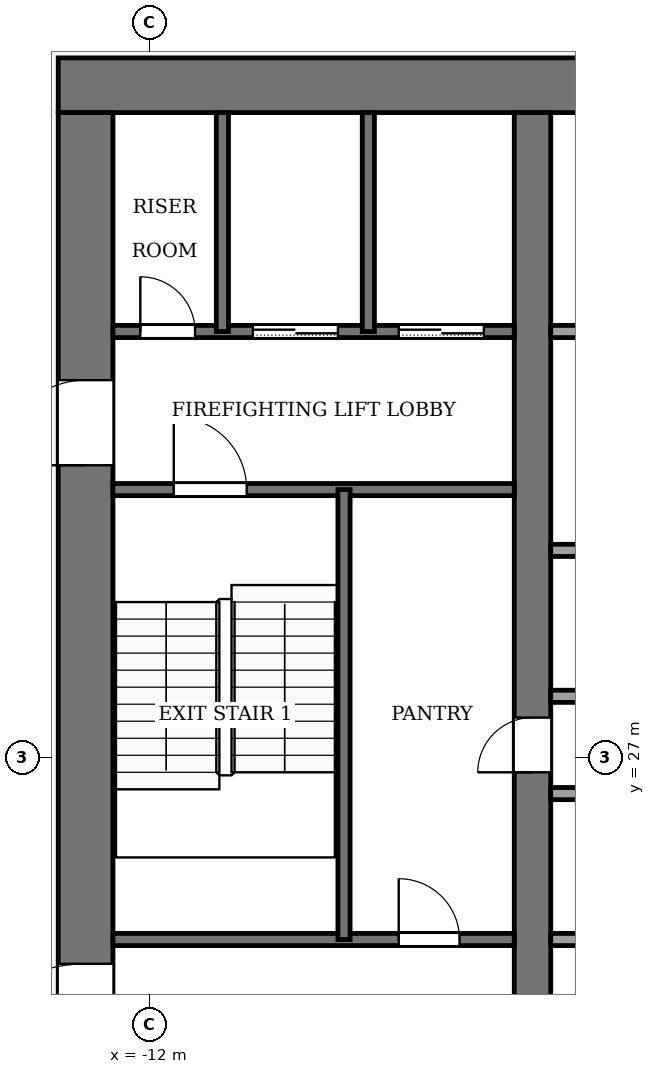
"""IFC4 building model, lengths in metres.
Left out: names, types, materials, properties, quantities, classifications, styles, units other than length and angle.
Written with IfcOpenShell. Run it as: python <this file> out.ifc"""

import sys

from ifc_helpers import new_model, si_unit, direction, frame, frame_2d, origin, place, context, subcontext, project, spatial, rectangle, extrude, element, fill, save


model = new_model("IFC4")
c1 = context("Model", 3, precision=1e-05, world=origin(), true_north=direction((0.0, 1.0)))
c2 = subcontext(c1, "Body", "Model", "MODEL_VIEW")
j1 = project(units=[si_unit("LENGTHUNIT", "METRE"), si_unit("PLANEANGLEUNIT", "RADIAN")], contexts=[c1])
p1 = place(None, origin())
s1 = spatial("IfcSite", under=j1, at=p1, CompositionType="ELEMENT")
p2 = place(p1, origin())
s2 = spatial("IfcBuilding", under=s1, at=p2, CompositionType="ELEMENT")
p3 = place(p2, frame((0.0, 0.0, 214.0)))
s3 = spatial("IfcBuildingStorey", under=s2, at=p3, CompositionType="ELEMENT", Elevation=214.0)
p4 = place(p3, frame((-13.5, 38.05, -0.13), z_axis=(0.0, 0.0, 1.0), x_axis=(1.0, 0.0, 0.0)))
e1 = element("IfcWall", 1, at=p4, inside=s3, PredefinedType="SHEAR", context=c2, shape_type="SweptSolid", body=[
    extrude(rectangle(XDim=27.0, YDim=0.9, at=frame_2d((13.5, 0.0))), origin(), (0.0, 0.0, 1.0), 4.0),
])
p5 = place(p3, frame((-13.05, 18.4, -0.13), z_axis=(0.0, 0.0, 1.0), x_axis=(0.0, 1.0, 0.0)))
e2 = element("IfcWall", 2, at=p5, inside=s3, PredefinedType="SHEAR", context=c2, shape_type="SweptSolid", body=[
    extrude(rectangle(XDim=19.2, YDim=0.9, at=frame_2d((9.6, 0.0))), origin(), (0.0, 0.0, 1.0), 4.0),
])
p6 = place(p5, frame((2.8, 0.0, 0.13)))
e3 = element("IfcOpeningElement", 3, at=p6, cuts=e2, PredefinedType="OPENING", context=c2, shape_type="SweptSolid", body=[
    extrude(rectangle(XDim=2.4, YDim=2.4, at=frame_2d((1.2, 1.2))), frame((0.0, 0.46, 0.0), z_axis=(0.0, -1.0, 0.0), x_axis=(1.0, 0.0, 0.0)), (0.0, 0.0, 1.0), 0.92),
])
p7 = place(p5, frame((13.4, 0.0, 0.13)))
e4 = element("IfcOpeningElement", 4, at=p7, cuts=e2, PredefinedType="OPENING", context=c2, shape_type="SweptSolid", body=[
    extrude(rectangle(XDim=1.4, YDim=2.2, at=frame_2d((0.7, 1.1))), frame((0.0, 0.46, 0.0), z_axis=(0.0, -1.0, 0.0), x_axis=(1.0, 0.0, 0.0)), (0.0, 0.0, 1.0), 0.92),
])
p8 = place(p3, frame((-5.7, 18.4, -0.13), z_axis=(0.0, 0.0, 1.0), x_axis=(0.0, 1.0, 0.0)))
e5 = element("IfcWall", 5, at=p8, inside=s3, PredefinedType="SHEAR", context=c2, shape_type="SweptSolid", body=[
    extrude(rectangle(XDim=19.2, YDim=0.6, at=frame_2d((9.6, 0.0))), origin(), (0.0, 0.0, 1.0), 4.0),
])
p9 = place(p8, frame((8.35, 0.0, 0.13)))
e6 = element("IfcOpeningElement", 6, at=p9, cuts=e5, PredefinedType="OPENING", context=c2, shape_type="SweptSolid", body=[
    extrude(rectangle(XDim=0.9, YDim=2.1, at=frame_2d((0.45, 1.05))), frame((0.0, 0.31, 0.0), z_axis=(0.0, -1.0, 0.0), x_axis=(1.0, 0.0, 0.0)), (0.0, 0.0, 1.0), 0.62),
])
p10 = place(p3, frame((-12.6, 24.0, 0.0), z_axis=(0.0, 0.0, 1.0), x_axis=(1.0, 0.0, 0.0)))
e7 = element("IfcWall", 7, at=p10, inside=s3, PredefinedType="PARTITIONING", context=c2, shape_type="SweptSolid", body=[
    extrude(rectangle(XDim=6.6, YDim=0.2, at=frame_2d((3.3, 0.0))), origin(), (0.0, 0.0, 1.0), 3.87),
])
p11 = place(p10, frame((4.7, 0.0, 0.0)))
e8 = element("IfcOpeningElement", 8, at=p11, cuts=e7, PredefinedType="OPENING", context=c2, shape_type="SweptSolid", body=[
    extrude(rectangle(XDim=1.0, YDim=2.1, at=frame_2d((0.5, 1.05))), frame((0.0, 0.11, 0.0), z_axis=(0.0, -1.0, 0.0), x_axis=(1.0, 0.0, 0.0)), (0.0, 0.0, 1.0), 0.22),
])
p12 = place(p3, frame((-5.4, 24.0, 0.0), z_axis=(0.0, 0.0, 1.0), x_axis=(1.0, 0.0, 0.0)))
e9 = element("IfcWall", 9, at=p12, inside=s3, PredefinedType="PARTITIONING", context=c2, shape_type="SweptSolid", body=[
    extrude(rectangle(XDim=10.8, YDim=0.2, at=frame_2d((5.4, 0.0))), origin(), (0.0, 0.0, 1.0), 3.87),
])
p13 = place(p12, frame((0.75, 0.0, 0.0)))
e10 = element("IfcOpeningElement", 10, at=p13, cuts=e9, PredefinedType="OPENING", context=c2, shape_type="SweptSolid", body=[
    extrude(rectangle(XDim=1.2, YDim=2.2, at=frame_2d((0.6, 1.1))), frame((0.0, 0.11, 0.0), z_axis=(0.0, -1.0, 0.0), x_axis=(1.0, 0.0, 0.0)), (0.0, 0.0, 1.0), 0.22),
])
p14 = place(p12, frame((3.45, 0.0, 0.0)))
e11 = element("IfcOpeningElement", 11, at=p14, cuts=e9, PredefinedType="OPENING", context=c2, shape_type="SweptSolid", body=[
    extrude(rectangle(XDim=1.2, YDim=2.2, at=frame_2d((0.6, 1.1))), frame((0.0, 0.11, 0.0), z_axis=(0.0, -1.0, 0.0), x_axis=(1.0, 0.0, 0.0)), (0.0, 0.0, 1.0), 0.22),
])
p15 = place(p12, frame((6.15, 0.0, 0.0)))
e12 = element("IfcOpeningElement", 12, at=p15, cuts=e9, PredefinedType="OPENING", context=c2, shape_type="SweptSolid", body=[
    extrude(rectangle(XDim=1.2, YDim=2.2, at=frame_2d((0.6, 1.1))), frame((0.0, 0.11, 0.0), z_axis=(0.0, -1.0, 0.0), x_axis=(1.0, 0.0, 0.0)), (0.0, 0.0, 1.0), 0.22),
])
p16 = place(p12, frame((8.85, 0.0, 0.0)))
e13 = element("IfcOpeningElement", 13, at=p16, cuts=e9, PredefinedType="OPENING", context=c2, shape_type="SweptSolid", body=[
    extrude(rectangle(XDim=1.2, YDim=2.2, at=frame_2d((0.6, 1.1))), frame((0.0, 0.11, 0.0), z_axis=(0.0, -1.0, 0.0), x_axis=(1.0, 0.0, 0.0)), (0.0, 0.0, 1.0), 0.22),
])
for number, where, z_axis, x_axis in (
    (14, (-5.4, 26.4, 0.0), (0.0, 0.0, 1.0), (1.0, 0.0, 0.0)),
    (15, (-5.4, 28.0, 0.0), (0.0, 0.0, 1.0), (1.0, 0.0, 0.0)),
):
    element("IfcWall", number, at=place(p3, frame(where, z_axis=z_axis, x_axis=x_axis)), inside=s3, PredefinedType="PARTITIONING", context=c2, shape_type="SweptSolid", body=[
        extrude(rectangle(XDim=10.8, YDim=0.2, at=frame_2d((5.4, 0.0))), origin(), (0.0, 0.0, 1.0), 3.87),
    ])
p17 = place(p3, frame((-5.4, 30.4, 0.0), z_axis=(0.0, 0.0, 1.0), x_axis=(1.0, 0.0, 0.0)))
e16 = element("IfcWall", 16, at=p17, inside=s3, PredefinedType="PARTITIONING", context=c2, shape_type="SweptSolid", body=[
    extrude(rectangle(XDim=10.8, YDim=0.2, at=frame_2d((5.4, 0.0))), origin(), (0.0, 0.0, 1.0), 3.87),
])
p18 = place(p17, frame((2.848, 0.0, 0.0)))
e17 = element("IfcOpeningElement", 17, at=p18, cuts=e16, PredefinedType="OPENING", context=c2, shape_type="SweptSolid", body=[
    extrude(rectangle(XDim=1.0, YDim=2.1, at=frame_2d((0.5, 1.05))), frame((0.0, 0.11, 0.0), z_axis=(0.0, -1.0, 0.0), x_axis=(1.0, 0.0, 0.0)), (0.0, 0.0, 1.0), 0.22),
])
p19 = place(p17, frame((8.248, 0.0, 0.0)))
e18 = element("IfcOpeningElement", 18, at=p19, cuts=e16, PredefinedType="OPENING", context=c2, shape_type="SweptSolid", body=[
    extrude(rectangle(XDim=1.0, YDim=2.1, at=frame_2d((0.5, 1.05))), frame((0.0, 0.11, 0.0), z_axis=(0.0, -1.0, 0.0), x_axis=(1.0, 0.0, 0.0)), (0.0, 0.0, 1.0), 0.22),
])
p20 = place(p3, frame((-12.6, 31.4, 0.0), z_axis=(0.0, 0.0, 1.0), x_axis=(1.0, 0.0, 0.0)))
e19 = element("IfcWall", 19, at=p20, inside=s3, PredefinedType="PARTITIONING", context=c2, shape_type="SweptSolid", body=[
    extrude(rectangle(XDim=6.6, YDim=0.2, at=frame_2d((3.3, 0.0))), origin(), (0.0, 0.0, 1.0), 3.87),
])
p21 = place(p20, frame((1.0, 0.0, 0.0)))
e20 = element("IfcOpeningElement", 20, at=p21, cuts=e19, PredefinedType="OPENING", context=c2, shape_type="SweptSolid", body=[
    extrude(rectangle(XDim=1.2, YDim=2.2, at=frame_2d((0.6, 1.1))), frame((0.0, 0.11, 0.0), z_axis=(0.0, -1.0, 0.0), x_axis=(1.0, 0.0, 0.0)), (0.0, 0.0, 1.0), 0.22),
])
p22 = place(p3, frame((-12.6, 34.0, 0.0), z_axis=(0.0, 0.0, 1.0), x_axis=(1.0, 0.0, 0.0)))
e21 = element("IfcWall", 21, at=p22, inside=s3, PredefinedType="PARTITIONING", context=c2, shape_type="SweptSolid", body=[
    extrude(rectangle(XDim=6.6, YDim=0.2, at=frame_2d((3.3, 0.0))), origin(), (0.0, 0.0, 1.0), 3.87),
])
p23 = place(p22, frame((4.7, 0.0, 0.0)))
e22 = element("IfcOpeningElement", 22, at=p23, cuts=e21, PredefinedType="OPENING", context=c2, shape_type="SweptSolid", body=[
    extrude(rectangle(XDim=1.4, YDim=2.2, at=frame_2d((0.7, 1.1))), frame((0.0, 0.11, 0.0), z_axis=(0.0, -1.0, 0.0), x_axis=(1.0, 0.0, 0.0)), (0.0, 0.0, 1.0), 0.22),
])
p24 = place(p22, frame((2.3, 0.0, 0.0)))
e23 = element("IfcOpeningElement", 23, at=p24, cuts=e21, PredefinedType="OPENING", context=c2, shape_type="SweptSolid", body=[
    extrude(rectangle(XDim=1.4, YDim=2.2, at=frame_2d((0.7, 1.1))), frame((0.0, 0.11, 0.0), z_axis=(0.0, -1.0, 0.0), x_axis=(1.0, 0.0, 0.0)), (0.0, 0.0, 1.0), 0.22),
])
p25 = place(p22, frame((0.45, 0.0, 0.0)))
e24 = element("IfcOpeningElement", 24, at=p25, cuts=e21, PredefinedType="OPENING", context=c2, shape_type="SweptSolid", body=[
    extrude(rectangle(XDim=0.9, YDim=2.1, at=frame_2d((0.45, 1.05))), frame((0.0, 0.11, 0.0), z_axis=(0.0, -1.0, 0.0), x_axis=(1.0, 0.0, 0.0)), (0.0, 0.0, 1.0), 0.22),
])
p26 = place(p3, frame((-5.4, 34.0, 0.0), z_axis=(0.0, 0.0, 1.0), x_axis=(1.0, 0.0, 0.0)))
e25 = element("IfcWall", 25, at=p26, inside=s3, PredefinedType="PARTITIONING", context=c2, shape_type="SweptSolid", body=[
    extrude(rectangle(XDim=10.8, YDim=0.2, at=frame_2d((5.4, 0.0))), origin(), (0.0, 0.0, 1.0), 3.87),
])
p27 = place(p26, frame((6.15, 0.0, 0.0)))
e26 = element("IfcOpeningElement", 26, at=p27, cuts=e25, PredefinedType="OPENING", context=c2, shape_type="SweptSolid", body=[
    extrude(rectangle(XDim=1.2, YDim=2.2, at=frame_2d((0.6, 1.1))), frame((0.0, 0.11, 0.0), z_axis=(0.0, -1.0, 0.0), x_axis=(1.0, 0.0, 0.0)), (0.0, 0.0, 1.0), 0.22),
])
p28 = place(p26, frame((8.95, 0.0, 0.0)))
e27 = element("IfcOpeningElement", 27, at=p28, cuts=e25, PredefinedType="OPENING", context=c2, shape_type="SweptSolid", body=[
    extrude(rectangle(XDim=1.0, YDim=2.1, at=frame_2d((0.5, 1.05))), frame((0.0, 0.11, 0.0), z_axis=(0.0, -1.0, 0.0), x_axis=(1.0, 0.0, 0.0)), (0.0, 0.0, 1.0), 0.22),
])
p29 = place(p3, frame((-10.8, 34.0, 0.0), z_axis=(0.0, 0.0, 1.0), x_axis=(0.0, 1.0, 0.0)))
e28 = element("IfcWall", 28, at=p29, inside=s3, PredefinedType="PARTITIONING", context=c2, shape_type="SweptSolid", body=[
    extrude(rectangle(XDim=3.6, YDim=0.2, at=frame_2d((1.8, 0.0))), origin(), (0.0, 0.0, 1.0), 3.87),
])
p30 = place(p3, frame((-8.8, 24.0, 0.0), z_axis=(0.0, 0.0, 1.0), x_axis=(0.0, 1.0, 0.0)))
e29 = element("IfcWall", 29, at=p30, inside=s3, PredefinedType="PARTITIONING", context=c2, shape_type="SweptSolid", body=[
    extrude(rectangle(XDim=7.4, YDim=0.2, at=frame_2d((3.7, 0.0))), origin(), (0.0, 0.0, 1.0), 3.87),
])
p31 = place(p3, frame((-8.4, 34.0, 0.0), z_axis=(0.0, 0.0, 1.0), x_axis=(0.0, 1.0, 0.0)))
e30 = element("IfcWall", 30, at=p31, inside=s3, PredefinedType="PARTITIONING", context=c2, shape_type="SweptSolid", body=[
    extrude(rectangle(XDim=3.6, YDim=0.2, at=frame_2d((1.8, 0.0))), origin(), (0.0, 0.0, 1.0), 3.87),
])
p32 = place(p23, origin())
e31 = element("IfcDoor", 31, at=p32, inside=s3, OperationType="SLIDING_TO_LEFT", PredefinedType="DOOR", context=c2, shape_type="SweptSolid", body=[
    extrude(rectangle(XDim=1.4, YDim=2.2, at=frame_2d((0.7, 1.1))), frame((0.0, 0.025, 0.0), z_axis=(0.0, -1.0, 0.0), x_axis=(1.0, 0.0, 0.0)), (0.0, 0.0, 1.0), 0.05),
])
fill(e22, e31)
p33 = place(p24, origin())
e32 = element("IfcDoor", 32, at=p33, inside=s3, OperationType="SLIDING_TO_LEFT", PredefinedType="DOOR", context=c2, shape_type="SweptSolid", body=[
    extrude(rectangle(XDim=1.4, YDim=2.2, at=frame_2d((0.7, 1.1))), frame((0.0, 0.025, 0.0), z_axis=(0.0, -1.0, 0.0), x_axis=(1.0, 0.0, 0.0)), (0.0, 0.0, 1.0), 0.05),
])
fill(e23, e32)
p34 = place(p25, origin())
e33 = element("IfcDoor", 33, at=p34, inside=s3, OperationType="SINGLE_SWING_RIGHT", PredefinedType="DOOR", context=c2, shape_type="SweptSolid", body=[
    extrude(rectangle(XDim=0.9, YDim=2.1, at=frame_2d((0.45, 1.05))), frame((0.0, 0.025, 0.0), z_axis=(0.0, -1.0, 0.0), x_axis=(1.0, 0.0, 0.0)), (0.0, 0.0, 1.0), 0.05),
])
fill(e24, e33)
p35 = place(p11, origin())
e34 = element("IfcDoor", 34, at=p35, inside=s3, OperationType="SINGLE_SWING_RIGHT", PredefinedType="DOOR", context=c2, shape_type="SweptSolid", body=[
    extrude(rectangle(XDim=1.0, YDim=2.1, at=frame_2d((0.5, 1.05))), frame((0.0, 0.025, 0.0), z_axis=(0.0, -1.0, 0.0), x_axis=(1.0, 0.0, 0.0)), (0.0, 0.0, 1.0), 0.05),
])
fill(e8, e34)
p36 = place(p9, origin())
e35 = element("IfcDoor", 35, at=p36, inside=s3, OperationType="SINGLE_SWING_LEFT", PredefinedType="DOOR", context=c2, shape_type="SweptSolid", body=[
    extrude(rectangle(XDim=0.9, YDim=2.1, at=frame_2d((0.45, 1.05))), frame((0.0, 0.025, 0.0), z_axis=(0.0, -1.0, 0.0), x_axis=(1.0, 0.0, 0.0)), (0.0, 0.0, 1.0), 0.05),
])
fill(e6, e35)
p37 = place(p21, origin())
e36 = element("IfcDoor", 36, at=p37, inside=s3, OperationType="SINGLE_SWING_LEFT", PredefinedType="DOOR", context=c2, shape_type="SweptSolid", body=[
    extrude(rectangle(XDim=1.2, YDim=2.2, at=frame_2d((0.6, 1.1))), frame((0.0, 0.025, 0.0), z_axis=(0.0, -1.0, 0.0), x_axis=(1.0, 0.0, 0.0)), (0.0, 0.0, 1.0), 0.05),
])
fill(e20, e36)
p38 = place(p6, origin())
e37 = element("IfcDoor", 37, at=p38, inside=s3, OperationType="DOUBLE_DOOR_SINGLE_SWING", PredefinedType="DOOR", context=c2, shape_type="SweptSolid", body=[
    extrude(rectangle(XDim=2.4, YDim=2.4, at=frame_2d((1.2, 1.2))), frame((0.0, 0.025, 0.0), z_axis=(0.0, -1.0, 0.0), x_axis=(1.0, 0.0, 0.0)), (0.0, 0.0, 1.0), 0.05),
])
fill(e3, e37)
p39 = place(p7, origin())
e38 = element("IfcDoor", 38, at=p39, inside=s3, OperationType="SINGLE_SWING_LEFT", PredefinedType="DOOR", context=c2, shape_type="SweptSolid", body=[
    extrude(rectangle(XDim=1.4, YDim=2.2, at=frame_2d((0.7, 1.1))), frame((0.0, 0.025, 0.0), z_axis=(0.0, -1.0, 0.0), x_axis=(1.0, 0.0, 0.0)), (0.0, 0.0, 1.0), 0.05),
])
fill(e4, e38)
save(model, sys.argv[1])
